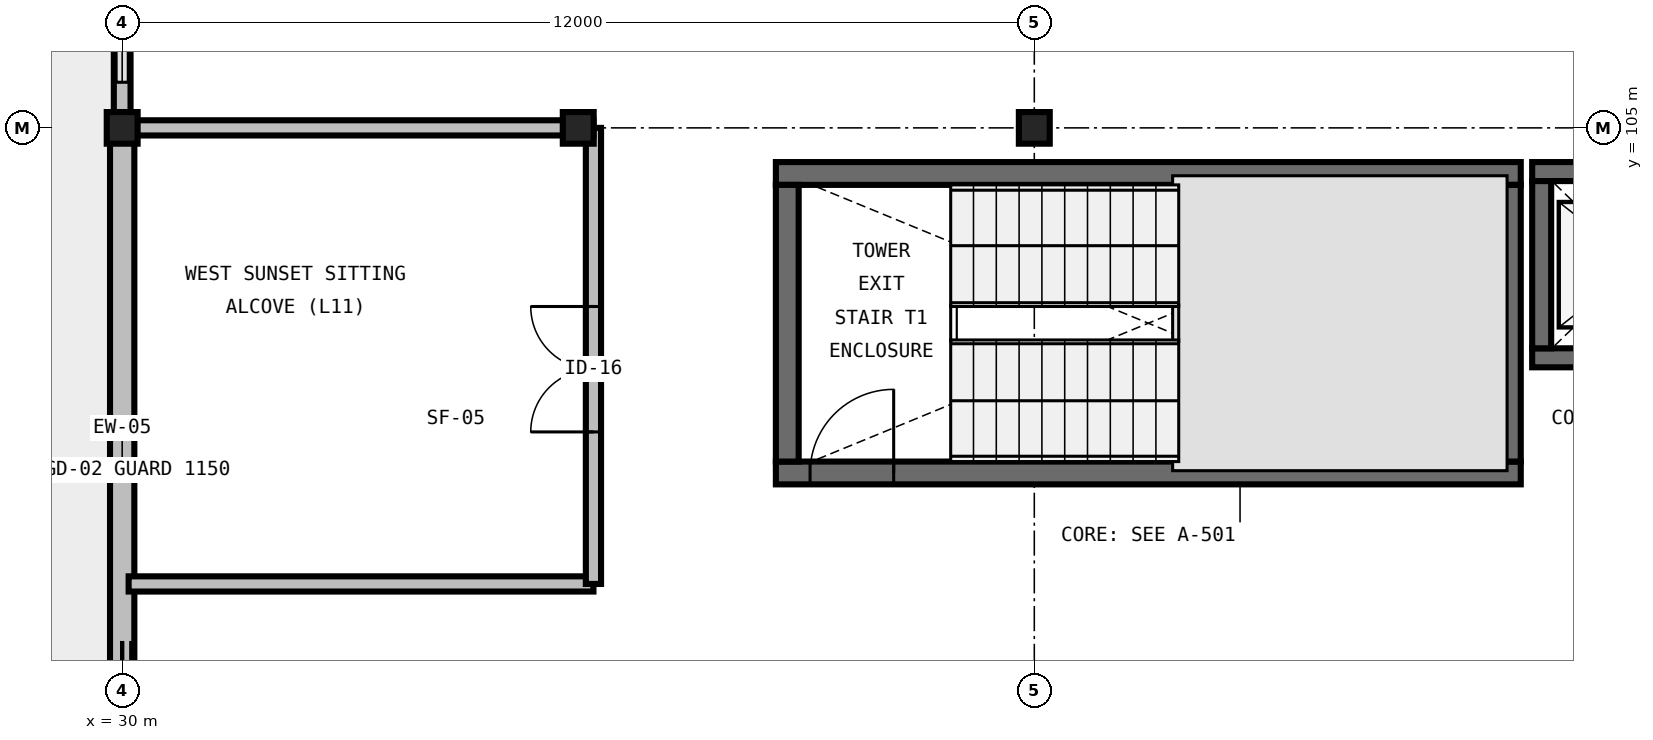
"""IFC4 building model, lengths in metres.
Left out: names, types, materials, properties, quantities, classifications, styles, units other than length and angle.
Written with IfcOpenShell. Run it as: python <this file> out.ifc"""

import sys

from ifc_helpers import new_model, si_unit, direction, frame, frame_2d, origin, origin_2d, place, context, subcontext, project, spatial, rectangle, i_section, extrude, element, fill, save


model = new_model("IFC4")
c1 = context("Model", 3, precision=1e-05, world=origin(), true_north=direction((0.0, 1.0)))
c2 = subcontext(c1, "Body", "Model", "MODEL_VIEW")
j1 = project(units=[si_unit("LENGTHUNIT", "METRE"), si_unit("PLANEANGLEUNIT", "RADIAN")], contexts=[c1])
p1 = place(None, origin())
s1 = spatial("IfcSite", under=j1, at=p1, CompositionType="ELEMENT")
p2 = place(p1, origin())
s2 = spatial("IfcBuilding", under=s1, at=p2, CompositionType="ELEMENT")
p3 = place(p2, frame((0.0, 0.0, 49.2)))
s3 = spatial("IfcBuildingStorey", under=s2, at=p3, CompositionType="ELEMENT", Elevation=49.2)
for number, where, z_axis, x_axis in (
    (1, (30.0, 105.0, 0.0), (0.0, 0.0, 1.0), (1.0, 0.0, 0.0)),
    (2, (36.0, 105.0, 0.0), (0.0, 0.0, 1.0), (1.0, 0.0, 0.0)),
    (3, (42.0, 105.0, 0.0), (0.0, 0.0, 1.0), (1.0, 0.0, 0.0)),
):
    element("IfcColumn", number, at=place(p3, frame(where, z_axis=z_axis, x_axis=x_axis)), inside=s3, PredefinedType="COLUMN", context=c2, shape_type="SweptSolid", body=[
        extrude(i_section(OverallWidth=0.406, OverallDepth=0.416, WebThickness=0.03, FlangeThickness=0.048, FilletRadius=0.031, at=origin_2d()), origin(), (0.0, 0.0, 1.0), 3.6),
    ])
p4 = place(p3, frame((38.6, 100.46, 0.0), z_axis=(0.0, 0.0, 1.0), x_axis=(1.0, 0.0, 0.0)))
e4 = element("IfcWall", 4, at=p4, inside=s3, PredefinedType="SHEAR", context=c2, shape_type="SweptSolid", body=[
    extrude(rectangle(XDim=9.8, YDim=0.3, at=frame_2d((4.9, 0.0))), origin(), (0.0, 0.0, 1.0), 3.6),
])
p5 = place(p4, frame((0.45, 0.0, 0.0)))
e5 = element("IfcOpeningElement", 5, at=p5, cuts=e4, PredefinedType="OPENING", context=c2, shape_type="SweptSolid", body=[
    extrude(rectangle(XDim=1.1, YDim=2.2, at=frame_2d((0.55, 1.1))), frame((0.0, 0.165, 0.0), z_axis=(0.0, -1.0, 0.0), x_axis=(1.0, 0.0, 0.0)), (0.0, 0.0, 1.0), 0.33),
])
p6 = place(p3, frame((48.4, 104.4, 0.0), z_axis=(0.0, 0.0, 1.0), x_axis=(-1.0, 0.0, 0.0)))
e6 = element("IfcWall", 6, at=p6, inside=s3, PredefinedType="SHEAR", context=c2, shape_type="SweptSolid", body=[
    extrude(rectangle(XDim=9.8, YDim=0.3, at=frame_2d((4.9, 0.0))), origin(), (0.0, 0.0, 1.0), 3.6),
])
for number, where, z_axis, x_axis in (
    (7, (38.75, 104.25, 0.0), (0.0, 0.0, 1.0), (0.0, -1.0, 0.0)),
    (8, (48.25, 100.61, 0.0), (0.0, 0.0, 1.0), (0.0, 1.0, 0.0)),
):
    element("IfcWall", number, at=place(p3, frame(where, z_axis=z_axis, x_axis=x_axis)), inside=s3, PredefinedType="SHEAR", context=c2, shape_type="SweptSolid", body=[
        extrude(rectangle(XDim=3.64, YDim=0.3, at=frame_2d((1.82, 0.0))), origin(), (0.0, 0.0, 1.0), 3.6),
    ])
p7 = place(p3, frame((48.55, 101.975, 0.0), z_axis=(0.0, 0.0, 1.0), x_axis=(1.0, 0.0, 0.0)))
e9 = element("IfcWall", 9, at=p7, inside=s3, PredefinedType="SHEAR", context=c2, shape_type="SweptSolid", body=[
    extrude(rectangle(XDim=2.8, YDim=0.25, at=frame_2d((1.4, 0.0))), origin(), (0.0, 0.0, 1.0), 3.6),
])
p8 = place(p7, frame((0.8, 0.0, 0.0)))
e10 = element("IfcOpeningElement", 10, at=p8, cuts=e9, PredefinedType="OPENING", context=c2, shape_type="SweptSolid", body=[
    extrude(rectangle(XDim=1.2, YDim=2.2, at=frame_2d((0.6, 1.1))), frame((0.0, 0.14, 0.0), z_axis=(0.0, -1.0, 0.0), x_axis=(1.0, 0.0, 0.0)), (0.0, 0.0, 1.0), 0.28),
])
p9 = place(p3, frame((51.35, 104.425, 0.0), z_axis=(0.0, 0.0, 1.0), x_axis=(-1.0, 0.0, 0.0)))
e11 = element("IfcWall", 11, at=p9, inside=s3, PredefinedType="SHEAR", context=c2, shape_type="SweptSolid", body=[
    extrude(rectangle(XDim=2.8, YDim=0.25, at=frame_2d((1.4, 0.0))), origin(), (0.0, 0.0, 1.0), 3.6),
])
p10 = place(p3, frame((48.675, 104.3, 0.0), z_axis=(0.0, 0.0, 1.0), x_axis=(0.0, -1.0, 0.0)))
e12 = element("IfcWall", 12, at=p10, inside=s3, PredefinedType="SHEAR", context=c2, shape_type="SweptSolid", body=[
    extrude(rectangle(XDim=2.2, YDim=0.25, at=frame_2d((1.1, 0.0))), origin(), (0.0, 0.0, 1.0), 3.6),
])
p11 = place(p3, frame((30.0, 105.0, 0.0), z_axis=(0.0, 0.0, 1.0), x_axis=(0.0, -1.0, 0.0)))
e13 = element("IfcWall", 13, at=p11, inside=s3, PredefinedType="STANDARD", context=c2, shape_type="SweptSolid", body=[
    extrude(rectangle(XDim=9.0, YDim=0.32, at=frame_2d((4.5, 0.0))), origin(), (0.0, 0.0, 1.0), 2.981),
])
p12 = place(p11, frame((6.75, 0.0, 0.0)))
e14 = element("IfcOpeningElement", 14, at=p12, cuts=e13, PredefinedType="OPENING", context=c2, shape_type="SweptSolid", body=[
    extrude(rectangle(XDim=1.6, YDim=2.15, at=frame_2d((0.8, 1.075))), frame((0.0, 0.175, 0.0), z_axis=(0.0, -1.0, 0.0), x_axis=(1.0, 0.0, 0.0)), (0.0, 0.0, 1.0), 0.35),
])
p13 = place(p3, frame((30.0, 117.0, 0.0), z_axis=(0.0, 0.0, 1.0), x_axis=(0.0, -1.0, 0.0)))
e15 = element("IfcWall", 15, at=p13, inside=s3, PredefinedType="PARAPET", context=c2, shape_type="SweptSolid", body=[
    extrude(rectangle(XDim=12.0, YDim=0.22, at=frame_2d((6.0, 0.0))), origin(), (0.0, 0.0, 1.0), 0.2),
])
p14 = place(p3, frame((30.085, 99.0, 0.0), z_axis=(0.0, 0.0, 1.0), x_axis=(1.0, 0.0, 0.0)))
e16 = element("IfcWall", 16, at=p14, inside=s3, PredefinedType="PARTITIONING", context=c2, shape_type="SweptSolid", body=[
    extrude(rectangle(XDim=6.115, YDim=0.2, at=frame_2d((3.057, 0.0))), origin(), (0.0, 0.0, 1.0), 3.29),
])
p15 = place(p3, frame((36.2, 99.0, 0.0), z_axis=(0.0, 0.0, 1.0), x_axis=(0.0, 1.0, 0.0)))
e17 = element("IfcWall", 17, at=p15, inside=s3, PredefinedType="PARTITIONING", context=c2, shape_type="SweptSolid", body=[
    extrude(rectangle(XDim=6.0, YDim=0.2, at=frame_2d((3.0, 0.0))), origin(), (0.0, 0.0, 1.0), 3.29),
])
p16 = place(p15, frame((2.0, 0.0, 0.0)))
e18 = element("IfcOpeningElement", 18, at=p16, cuts=e17, PredefinedType="OPENING", context=c2, shape_type="SweptSolid", body=[
    extrude(rectangle(XDim=1.65, YDim=2.25, at=frame_2d((0.825, 1.125))), frame((0.0, 0.115, 0.0), z_axis=(0.0, -1.0, 0.0), x_axis=(1.0, 0.0, 0.0)), (0.0, 0.0, 1.0), 0.23),
])
p17 = place(p3, frame((36.2, 105.0, 0.0), z_axis=(0.0, 0.0, 1.0), x_axis=(-1.0, 0.0, 0.0)))
e19 = element("IfcWall", 19, at=p17, inside=s3, PredefinedType="PARTITIONING", context=c2, shape_type="SweptSolid", body=[
    extrude(rectangle(XDim=6.115, YDim=0.2, at=frame_2d((3.057, 0.0))), origin(), (0.0, 0.0, 1.0), 2.736),
])
p18 = place(p5, origin())
e20 = element("IfcDoor", 20, at=p18, inside=s3, OperationType="SINGLE_SWING_RIGHT", PredefinedType="DOOR", context=c2, shape_type="SweptSolid", body=[
    extrude(rectangle(XDim=1.1, YDim=2.2, at=frame_2d((0.55, 1.1))), frame((0.0, 0.025, 0.0), z_axis=(0.0, -1.0, 0.0), x_axis=(1.0, 0.0, 0.0)), (0.0, 0.0, 1.0), 0.05),
])
fill(e5, e20)
p19 = place(p12, origin())
e21 = element("IfcDoor", 21, at=p19, inside=s3, OperationType="DOUBLE_DOOR_SLIDING", PredefinedType="DOOR", context=c2, shape_type="SweptSolid", body=[
    extrude(rectangle(XDim=1.6, YDim=2.15, at=frame_2d((0.8, 1.075))), frame((0.0, 0.025, 0.0), z_axis=(0.0, -1.0, 0.0), x_axis=(1.0, 0.0, 0.0)), (0.0, 0.0, 1.0), 0.05),
])
fill(e14, e21)
p20 = place(p16, origin())
e22 = element("IfcDoor", 22, at=p20, inside=s3, OperationType="DOUBLE_DOOR_SINGLE_SWING", PredefinedType="DOOR", context=c2, shape_type="SweptSolid", body=[
    extrude(rectangle(XDim=1.65, YDim=2.25, at=frame_2d((0.825, 1.125))), frame((0.0, 0.025, 0.0), z_axis=(0.0, -1.0, 0.0), x_axis=(1.0, 0.0, 0.0)), (0.0, 0.0, 1.0), 0.05),
])
fill(e18, e22)
save(model, sys.argv[1])
